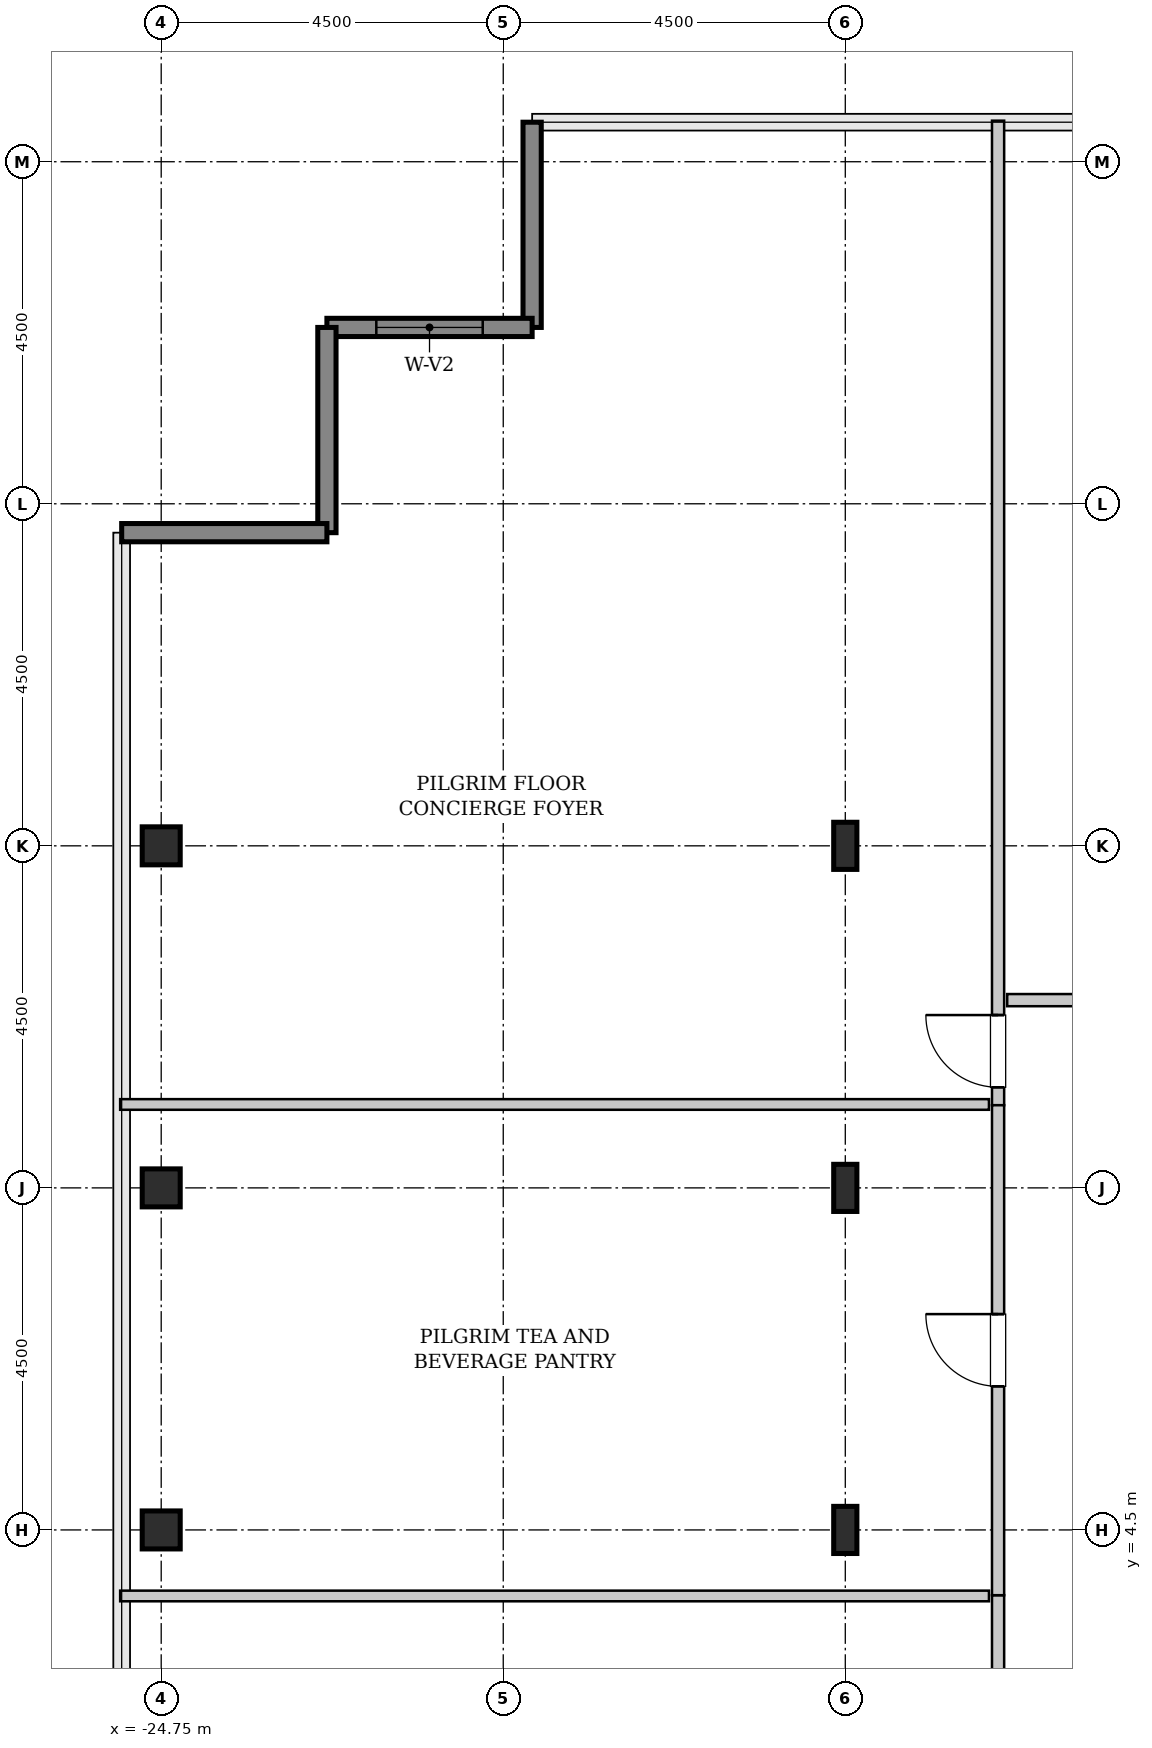
"""IFC4 building model, lengths in metres.
Left out: names, types, materials, properties, quantities, classifications, styles, units other than length and angle.
Written with IfcOpenShell. Run it as: python <this file> out.ifc"""

import sys

from ifc_helpers import new_model, si_unit, direction, frame, frame_2d, origin, origin_2d, place, context, subcontext, project, spatial, rectangle, hollow_rectangle, i_section, extrude, source, transform, mapped, element, fill, save


model = new_model("IFC4")
c1 = context("Model", 3, precision=1e-05, world=origin(), true_north=direction((0.0, 1.0)))
c2 = subcontext(c1, "Body", "Model", "MODEL_VIEW")
j1 = project(units=[si_unit("LENGTHUNIT", "METRE"), si_unit("PLANEANGLEUNIT", "RADIAN")], contexts=[c1])
p1 = place(None, origin())
s1 = spatial("IfcSite", under=j1, at=p1, CompositionType="ELEMENT")
p2 = place(p1, origin())
s2 = spatial("IfcBuilding", under=s1, at=p2, CompositionType="ELEMENT")
p3 = place(p2, frame((0.0, 0.0, 337.6)))
s3 = spatial("IfcBuildingStorey", under=s2, at=p3, CompositionType="ELEMENT", Elevation=337.6)
m1 = source(origin(), c2, "Body", "SweptSolid", [
    extrude(hollow_rectangle(XDim=0.5, YDim=0.5, WallThickness=0.025, InnerFilletRadius=0.025, OuterFilletRadius=0.05, at=origin_2d()), origin(), (0.0, 0.0, 1.0), 3.8),
])
for number, where, z_axis, x_axis in (
    (1, (-24.75, 4.5, 0.0), (0.0, 0.0, 1.0), (1.0, 0.0, 0.0)),
    (2, (-24.75, 9.0, 0.0), (0.0, 0.0, 1.0), (1.0, 0.0, 0.0)),
    (3, (-24.75, 13.5, 0.0), (0.0, 0.0, 1.0), (1.0, 0.0, 0.0)),
):
    element("IfcColumn", number, at=place(p3, frame(where, z_axis=z_axis, x_axis=x_axis)), inside=s3, PredefinedType="COLUMN", context=c2, shape_type="MappedRepresentation", body=[
        mapped(m1, transform((0.0, 0.0, 0.0), x_axis=(1.0, 0.0, 0.0), y_axis=(0.0, 1.0, 0.0), z_axis=(0.0, 0.0, 1.0), scale=1.0)),
    ])
m2 = source(origin(), c2, "Body", "SweptSolid", [
    extrude(i_section(OverallWidth=0.305, OverallDepth=0.62, WebThickness=0.021, FlangeThickness=0.04, FilletRadius=0.027, at=origin_2d()), origin(), (0.0, 0.0, 1.0), 3.8),
])
for number, where, z_axis, x_axis in (
    (4, (-15.75, 4.5, 0.0), (0.0, 0.0, 1.0), (1.0, 0.0, 0.0)),
    (5, (-15.75, 9.0, 0.0), (0.0, 0.0, 1.0), (1.0, 0.0, 0.0)),
    (6, (-15.75, 13.5, 0.0), (0.0, 0.0, 1.0), (1.0, 0.0, 0.0)),
):
    element("IfcColumn", number, at=place(p3, frame(where, z_axis=z_axis, x_axis=x_axis)), inside=s3, PredefinedType="COLUMN", context=c2, shape_type="MappedRepresentation", body=[
        mapped(m2, transform((0.0, 0.0, 0.0), x_axis=(1.0, 0.0, 0.0), y_axis=(0.0, 1.0, 0.0), z_axis=(0.0, 0.0, 1.0), scale=1.0)),
    ])
m3 = source(origin(), c2, "Body", "SweptSolid", [
    extrude(rectangle(XDim=2.7, YDim=0.24, at=frame_2d((1.35, 0.0))), origin(), (0.0, 0.0, 1.0), 3.55),
])
p4 = place(p3, frame((-19.87, 23.02, 0.0), z_axis=(0.0, 0.0, 1.0), x_axis=(0.0, -1.0, 0.0)))
e7 = element("IfcWall", 7, at=p4, inside=s3, PredefinedType="SHEAR", context=c2, shape_type="MappedRepresentation", body=[
    mapped(m3, transform((0.0, 0.0, 0.0), x_axis=(1.0, 0.0, 0.0), y_axis=(0.0, 1.0, 0.0), z_axis=(0.0, 0.0, 1.0), scale=1.0)),
])
p5 = place(p3, frame((-19.87, 20.32, 0.0), z_axis=(0.0, 0.0, 1.0), x_axis=(-1.0, 0.0, 0.0)))
e8 = element("IfcWall", 8, at=p5, inside=s3, PredefinedType="SHEAR", context=c2, shape_type="MappedRepresentation", body=[
    mapped(m3, transform((0.0, 0.0, 0.0), x_axis=(1.0, 0.0, 0.0), y_axis=(0.0, 1.0, 0.0), z_axis=(0.0, 0.0, 1.0), scale=1.0)),
])
p6 = place(p5, frame((0.65, 0.0, 0.85)))
e9 = element("IfcOpeningElement", 9, at=p6, cuts=e8, PredefinedType="OPENING", context=c2, shape_type="SweptSolid", body=[
    extrude(rectangle(XDim=1.4, YDim=1.8, at=frame_2d((0.7, 0.9))), frame((0.0, 0.13, 0.0), z_axis=(0.0, -1.0, 0.0), x_axis=(1.0, 0.0, 0.0)), (0.0, 0.0, 1.0), 0.26),
])
for number, where, z_axis, x_axis in (
    (10, (-22.57, 20.32, 0.0), (0.0, 0.0, 1.0), (0.0, -1.0, 0.0)),
    (11, (-22.57, 17.62, 0.0), (0.0, 0.0, 1.0), (-1.0, 0.0, 0.0)),
):
    element("IfcWall", number, at=place(p3, frame(where, z_axis=z_axis, x_axis=x_axis)), inside=s3, PredefinedType="SHEAR", context=c2, shape_type="MappedRepresentation", body=[
        mapped(m3, transform((0.0, 0.0, 0.0), x_axis=(1.0, 0.0, 0.0), y_axis=(0.0, 1.0, 0.0), z_axis=(0.0, 0.0, 1.0), scale=1.0)),
    ])
m4 = source(origin(), c2, "Body", "SweptSolid", [
    extrude(rectangle(XDim=12.953, YDim=0.16, at=frame_2d((6.476, 0.0))), origin(), (0.0, 0.0, 1.0), 3.535),
])
p7 = place(p3, frame((-13.74, 10.087, 0.0), z_axis=(0.0, 0.0, 1.0), x_axis=(0.0, 1.0, 0.0)))
e12 = element("IfcWall", 12, at=p7, inside=s3, PredefinedType="PARTITIONING", context=c2, shape_type="MappedRepresentation", body=[
    mapped(m4, transform((0.0, 0.0, 0.0), x_axis=(1.0, 0.0, 0.0), y_axis=(0.0, 1.0, 0.0), z_axis=(0.0, 0.0, 1.0), scale=1.0)),
])
p8 = place(p7, frame((0.236, 0.0, 0.0)))
e13 = element("IfcOpeningElement", 13, at=p8, cuts=e12, PredefinedType="OPENING", context=c2, shape_type="SweptSolid", body=[
    extrude(rectangle(XDim=0.95, YDim=2.1, at=frame_2d((0.475, 1.05))), frame((0.0, 0.09, 0.0), z_axis=(0.0, -1.0, 0.0), x_axis=(1.0, 0.0, 0.0)), (0.0, 0.0, 1.0), 0.18),
])
m5 = source(origin(), c2, "Body", "SweptSolid", [
    extrude(rectangle(XDim=11.43, YDim=0.14, at=frame_2d((5.715, 0.0))), origin(), (0.0, 0.0, 1.0), 3.535),
])
p9 = place(p3, frame((-25.29, 10.097, 0.0), z_axis=(0.0, 0.0, 1.0), x_axis=(1.0, 0.0, 0.0)))
e14 = element("IfcWall", 14, at=p9, inside=s3, PredefinedType="PARTITIONING", context=c2, shape_type="MappedRepresentation", body=[
    mapped(m5, transform((0.0, 0.0, 0.0), x_axis=(1.0, 0.0, 0.0), y_axis=(0.0, 1.0, 0.0), z_axis=(0.0, 0.0, 1.0), scale=1.0)),
])
m6 = source(origin(), c2, "Body", "SweptSolid", [
    extrude(rectangle(XDim=6.446, YDim=0.16, at=frame_2d((3.223, 0.0))), origin(), (0.0, 0.0, 1.0), 3.535),
])
p10 = place(p3, frame((-13.74, -2.805, 0.0), z_axis=(0.0, 0.0, 1.0), x_axis=(0.0, 1.0, 0.0)))
e15 = element("IfcWall", 15, at=p10, inside=s3, PredefinedType="PARTITIONING", context=c2, shape_type="MappedRepresentation", body=[
    mapped(m6, transform((0.0, 0.0, 0.0), x_axis=(1.0, 0.0, 0.0), y_axis=(0.0, 1.0, 0.0), z_axis=(0.0, 0.0, 1.0), scale=1.0)),
])
p11 = place(p10, frame((2.748, 0.0, 0.0)))
e16 = element("IfcOpeningElement", 16, at=p11, cuts=e15, PredefinedType="OPENING", context=c2, shape_type="SweptSolid", body=[
    extrude(rectangle(XDim=0.95, YDim=2.1, at=frame_2d((0.475, 1.05))), frame((0.0, 0.09, 0.0), z_axis=(0.0, -1.0, 0.0), x_axis=(1.0, 0.0, 0.0)), (0.0, 0.0, 1.0), 0.18),
])
p12 = place(p3, frame((-25.29, 3.631, 0.0), z_axis=(0.0, 0.0, 1.0), x_axis=(1.0, 0.0, 0.0)))
e17 = element("IfcWall", 17, at=p12, inside=s3, PredefinedType="PARTITIONING", context=c2, shape_type="MappedRepresentation", body=[
    mapped(m5, transform((0.0, 0.0, 0.0), x_axis=(1.0, 0.0, 0.0), y_axis=(0.0, 1.0, 0.0), z_axis=(0.0, 0.0, 1.0), scale=1.0)),
])
m7 = source(origin(), c2, "Body", "SweptSolid", [
    extrude(rectangle(XDim=6.446, YDim=0.16, at=frame_2d((3.223, 0.0))), origin(), (0.0, 0.0, 1.0), 3.535),
])
p13 = place(p3, frame((-13.74, 3.641, 0.0), z_axis=(0.0, 0.0, 1.0), x_axis=(0.0, 1.0, 0.0)))
e18 = element("IfcWall", 18, at=p13, inside=s3, PredefinedType="PARTITIONING", context=c2, shape_type="MappedRepresentation", body=[
    mapped(m7, transform((0.0, 0.0, 0.0), x_axis=(1.0, 0.0, 0.0), y_axis=(0.0, 1.0, 0.0), z_axis=(0.0, 0.0, 1.0), scale=1.0)),
])
p14 = place(p13, frame((2.748, 0.0, 0.0)))
e19 = element("IfcOpeningElement", 19, at=p14, cuts=e18, PredefinedType="OPENING", context=c2, shape_type="SweptSolid", body=[
    extrude(rectangle(XDim=0.95, YDim=2.1, at=frame_2d((0.475, 1.05))), frame((0.0, 0.09, 0.0), z_axis=(0.0, -1.0, 0.0), x_axis=(1.0, 0.0, 0.0)), (0.0, 0.0, 1.0), 0.18),
])
m8 = source(origin(), c2, "Body", "SweptSolid", [
    extrude(rectangle(XDim=4.125, YDim=0.16, at=frame_2d((2.062, 0.0))), origin(), (0.0, 0.0, 1.0), 3.535),
])
p15 = place(p3, frame((-13.62, 11.47, 0.0), z_axis=(0.0, 0.0, 1.0), x_axis=(1.0, 0.0, 0.0)))
e20 = element("IfcWall", 20, at=p15, inside=s3, PredefinedType="PARTITIONING", context=c2, shape_type="MappedRepresentation", body=[
    mapped(m8, transform((0.0, 0.0, 0.0), x_axis=(1.0, 0.0, 0.0), y_axis=(0.0, 1.0, 0.0), z_axis=(0.0, 0.0, 1.0), scale=1.0)),
])
p16 = place(p15, frame((1.587, 0.0, 0.0)))
e21 = element("IfcOpeningElement", 21, at=p16, cuts=e20, PredefinedType="OPENING", context=c2, shape_type="SweptSolid", body=[
    extrude(rectangle(XDim=0.95, YDim=2.1, at=frame_2d((0.475, 1.05))), frame((0.0, 0.09, 0.0), z_axis=(0.0, -1.0, 0.0), x_axis=(1.0, 0.0, 0.0)), (0.0, 0.0, 1.0), 0.18),
])
m9 = source(origin(), c2, "Body", "SweptSolid", [
    extrude(rectangle(XDim=1.4, YDim=1.8, at=frame_2d((0.7, 0.9))), frame((0.0, 0.03, 0.0), z_axis=(0.0, -1.0, 0.0), x_axis=(1.0, 0.0, 0.0)), (0.0, 0.0, 1.0), 0.06),
])
p17 = place(p6, origin())
e22 = element("IfcWindow", 22, at=p17, inside=s3, PartitioningType="SINGLE_PANEL", PredefinedType="WINDOW", context=c2, shape_type="MappedRepresentation", body=[
    mapped(m9, transform((0.0, 0.0, 0.0), x_axis=(1.0, 0.0, 0.0), y_axis=(0.0, 1.0, 0.0), z_axis=(0.0, 0.0, 1.0), scale=1.0)),
])
fill(e9, e22)
m10 = source(origin(), c2, "Body", "SweptSolid", [
    extrude(rectangle(XDim=0.95, YDim=2.1, at=frame_2d((0.475, 1.05))), frame((0.0, 0.025, 0.0), z_axis=(0.0, -1.0, 0.0), x_axis=(1.0, 0.0, 0.0)), (0.0, 0.0, 1.0), 0.05),
])
p18 = place(p8, origin())
e23 = element("IfcDoor", 23, at=p18, inside=s3, OperationType="SINGLE_SWING_RIGHT", PredefinedType="DOOR", context=c2, shape_type="MappedRepresentation", body=[
    mapped(m10, transform((0.0, 0.0, 0.0), x_axis=(1.0, 0.0, 0.0), y_axis=(0.0, 1.0, 0.0), z_axis=(0.0, 0.0, 1.0), scale=1.0)),
])
fill(e13, e23)
p19 = place(p14, origin())
e24 = element("IfcDoor", 24, at=p19, inside=s3, OperationType="SINGLE_SWING_RIGHT", PredefinedType="DOOR", context=c2, shape_type="MappedRepresentation", body=[
    mapped(m10, transform((0.0, 0.0, 0.0), x_axis=(1.0, 0.0, 0.0), y_axis=(0.0, 1.0, 0.0), z_axis=(0.0, 0.0, 1.0), scale=1.0)),
])
fill(e19, e24)
save(model, sys.argv[1])
